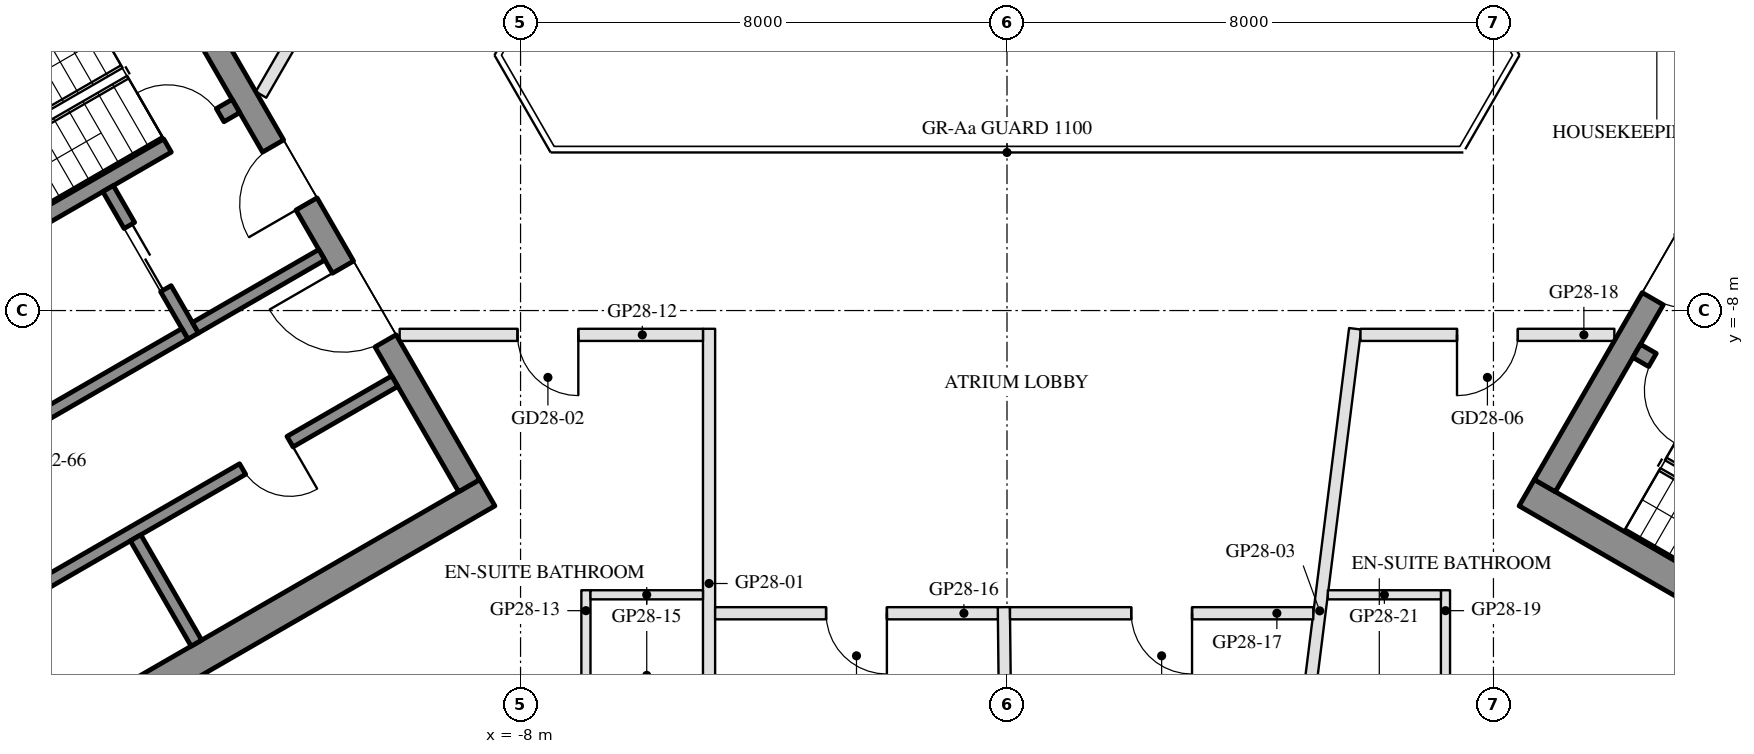
"""IFC4 building model, lengths in metres.
Left out: names, types, materials, properties, quantities, classifications, styles, units other than length and angle.
Written with IfcOpenShell. Run it as: python <this file> out.ifc"""

import sys

from ifc_helpers import new_model, si_unit, direction, frame, frame_2d, origin, place, context, subcontext, project, spatial, rectangle, extrude, element, fill, save


model = new_model("IFC4")
c1 = context("Model", 3, precision=1e-05, world=origin(), true_north=direction((0.0, 1.0)))
c2 = subcontext(c1, "Body", "Model", "MODEL_VIEW")
j1 = project(units=[si_unit("LENGTHUNIT", "METRE"), si_unit("PLANEANGLEUNIT", "RADIAN")], contexts=[c1])
p1 = place(None, origin())
s1 = spatial("IfcSite", under=j1, at=p1, CompositionType="ELEMENT")
p2 = place(p1, origin())
s2 = spatial("IfcBuilding", under=s1, at=p2, CompositionType="ELEMENT")
p3 = place(p2, frame((0.0, 0.0, 287.4)))
s3 = spatial("IfcBuildingStorey", under=s2, at=p3, CompositionType="ELEMENT", Elevation=287.4)
for number, where, z_axis, x_axis in (
    (1, (-13.797, -1.903, 0.0), (0.0, 0.0, 1.0), (-0.866, -0.5, 0.0)),
    (2, (-8.547, -10.997, 0.0), (0.0, 0.0, 1.0), (-0.866, -0.5, 0.0)),
):
    element("IfcWall", number, at=place(p3, frame(where, z_axis=z_axis, x_axis=x_axis)), inside=s3, PredefinedType="SHEAR", context=c2, shape_type="SweptSolid", body=[
        extrude(rectangle(XDim=12.129, YDim=0.5, at=frame_2d((6.064, 0.0))), origin(), (0.0, 0.0, 1.0), 3.5),
    ])
p4 = place(p3, frame((-13.845, -2.22, 0.0), z_axis=(0.0, 0.0, 1.0), x_axis=(0.500004234368, -0.866022959057, 0.0)))
e3 = element("IfcWall", 3, at=p4, inside=s3, PredefinedType="SHEAR", context=c2, shape_type="SweptSolid", body=[
    extrude(rectangle(XDim=10.0, YDim=0.4, at=frame_2d((5.0, 0.0))), origin(), (0.0, 0.0, 1.0), 3.5),
])
p5 = place(p4, frame((3.55, 0.0, 0.0)))
e4 = element("IfcOpeningElement", 4, at=p5, cuts=e3, PredefinedType="OPENING", context=c2, shape_type="SweptSolid", body=[
    extrude(rectangle(XDim=1.1, YDim=2.1, at=frame_2d((0.55, 1.05))), frame((0.0, 0.21, 0.0), z_axis=(0.0, -1.0, 0.0), x_axis=(1.0, 0.0, 0.0)), (0.0, 0.0, 1.0), 0.42),
])
p6 = place(p4, frame((5.85, 0.0, 0.0)))
e5 = element("IfcOpeningElement", 5, at=p6, cuts=e3, PredefinedType="OPENING", context=c2, shape_type="SweptSolid", body=[
    extrude(rectangle(XDim=1.4, YDim=2.1, at=frame_2d((0.7, 1.05))), frame((0.0, 0.21, 0.0), z_axis=(0.0, -1.0, 0.0), x_axis=(1.0, 0.0, 0.0)), (0.0, 0.0, 1.0), 0.42),
])
p7 = place(p3, frame((-12.681, -4.636, 0.0), z_axis=(0.0, 0.0, 1.0), x_axis=(-0.866021702275, -0.500006411147, 0.0)))
e6 = element("IfcWall", 6, at=p7, inside=s3, PredefinedType="SHEAR", context=c2, shape_type="SweptSolid", body=[
    extrude(rectangle(XDim=6.45, YDim=0.25, at=frame_2d((3.225, 0.0))), origin(), (0.0, 0.0, 1.0), 3.5),
])
p8 = place(p7, frame((0.3, 0.0, 0.0)))
e7 = element("IfcOpeningElement", 7, at=p8, cuts=e6, PredefinedType="OPENING", context=c2, shape_type="SweptSolid", body=[
    extrude(rectangle(XDim=1.0, YDim=2.1, at=frame_2d((0.5, 1.05))), frame((0.0, 0.135, 0.0), z_axis=(0.0, -1.0, 0.0), x_axis=(1.0, 0.0, 0.0)), (0.0, 0.0, 1.0), 0.27),
])
p9 = place(p3, frame((-14.783, -5.995, 0.0), z_axis=(0.0, 0.0, 1.0), x_axis=(0.49994636267, -0.866056369097, 0.0)))
e8 = element("IfcWall", 8, at=p9, inside=s3, PredefinedType="SHEAR", context=c2, shape_type="SweptSolid", body=[
    extrude(rectangle(XDim=2.8, YDim=0.2, at=frame_2d((1.4, 0.0))), origin(), (0.0, 0.0, 1.0), 3.5),
])
p10 = place(p9, frame((0.7, 0.0, 0.0)))
e9 = element("IfcOpeningElement", 9, at=p10, cuts=e8, PredefinedType="OPENING", context=c2, shape_type="SweptSolid", body=[
    extrude(rectangle(XDim=1.2, YDim=2.1, at=frame_2d((0.6, 1.05))), frame((0.0, 0.11, 0.0), z_axis=(0.0, -1.0, 0.0), x_axis=(1.0, 0.0, 0.0)), (0.0, 0.0, 1.0), 0.22),
])
p11 = place(p3, frame((-13.52, -8.383, 0.0), z_axis=(0.0, 0.0, 1.0), x_axis=(-0.866034573852, -0.49998411664, 0.0)))
e10 = element("IfcWall", 10, at=p11, inside=s3, PredefinedType="SHEAR", context=c2, shape_type="SweptSolid", body=[
    extrude(rectangle(XDim=2.8, YDim=0.2, at=frame_2d((1.4, 0.0))), origin(), (0.0, 0.0, 1.0), 3.5),
])
p12 = place(p3, frame((-11.268, -7.083, 0.0), z_axis=(0.0, 0.0, 1.0), x_axis=(-0.866050077142, -0.499957262057, 0.0)))
e11 = element("IfcWall", 11, at=p12, inside=s3, PredefinedType="SHEAR", context=c2, shape_type="SweptSolid", body=[
    extrude(rectangle(XDim=2.4, YDim=0.2, at=frame_2d((1.2, 0.0))), origin(), (0.0, 0.0, 1.0), 3.5),
])
p13 = place(p3, frame((-10.068, -9.162, 0.0), z_axis=(0.0, 0.0, 1.0), x_axis=(-0.866032725843, -0.499987317609, 0.0)))
e12 = element("IfcWall", 12, at=p13, inside=s3, PredefinedType="SHEAR", context=c2, shape_type="SweptSolid", body=[
    extrude(rectangle(XDim=10.16, YDim=0.2, at=frame_2d((5.08, 0.0))), origin(), (0.0, 0.0, 1.0), 3.5),
])
p14 = place(p13, frame((1.99, 0.0, 0.0)))
e13 = element("IfcOpeningElement", 13, at=p14, cuts=e12, PredefinedType="OPENING", context=c2, shape_type="SweptSolid", body=[
    extrude(rectangle(XDim=0.9, YDim=2.1, at=frame_2d((0.45, 1.05))), frame((0.0, 0.11, 0.0), z_axis=(0.0, -1.0, 0.0), x_axis=(1.0, 0.0, 0.0)), (0.0, 0.0, 1.0), 0.22),
])
p15 = place(p13, frame((7.07, 0.0, 0.0)))
e14 = element("IfcOpeningElement", 14, at=p15, cuts=e12, PredefinedType="OPENING", context=c2, shape_type="SweptSolid", body=[
    extrude(rectangle(XDim=0.9, YDim=2.1, at=frame_2d((0.45, 1.05))), frame((0.0, 0.11, 0.0), z_axis=(0.0, -1.0, 0.0), x_axis=(1.0, 0.0, 0.0)), (0.0, 0.0, 1.0), 0.22),
])
p16 = place(p3, frame((-14.331, -11.738, 0.0), z_axis=(0.0, 0.0, 1.0), x_axis=(0.499972520799, -0.866041268327, 0.0)))
e15 = element("IfcWall", 15, at=p16, inside=s3, PredefinedType="SHEAR", context=c2, shape_type="SweptSolid", body=[
    extrude(rectangle(XDim=2.0, YDim=0.2, at=frame_2d((1.0, 0.0))), origin(), (0.0, 0.0, 1.0), 3.5),
])
p17 = place(p3, frame((8.547, -10.997, 0.0), z_axis=(0.0, 0.0, 1.0), x_axis=(0.866024688907, -0.500001238203, 0.0)))
e16 = element("IfcWall", 16, at=p17, inside=s3, PredefinedType="SHEAR", context=c2, shape_type="SweptSolid", body=[
    extrude(rectangle(XDim=12.129, YDim=0.5, at=frame_2d((6.064, 0.0))), origin(), (0.0, 0.0, 1.0), 3.5),
])
p18 = place(p3, frame((8.845, -10.88, 0.0), z_axis=(0.0, 0.0, 1.0), x_axis=(0.500004234368, 0.866022959057, 0.0)))
e17 = element("IfcWall", 17, at=p18, inside=s3, PredefinedType="SHEAR", context=c2, shape_type="SweptSolid", body=[
    extrude(rectangle(XDim=10.0, YDim=0.4, at=frame_2d((5.0, 0.0))), origin(), (0.0, 0.0, 1.0), 3.5),
])
p19 = place(p18, frame((3.55, 0.0, 0.0)))
e18 = element("IfcOpeningElement", 18, at=p19, cuts=e17, PredefinedType="OPENING", context=c2, shape_type="SweptSolid", body=[
    extrude(rectangle(XDim=1.1, YDim=2.1, at=frame_2d((0.55, 1.05))), frame((0.0, 0.21, 0.0), z_axis=(0.0, -1.0, 0.0), x_axis=(1.0, 0.0, 0.0)), (0.0, 0.0, 1.0), 0.42),
])
p20 = place(p18, frame((5.85, 0.0, 0.0)))
e19 = element("IfcOpeningElement", 19, at=p20, cuts=e17, PredefinedType="OPENING", context=c2, shape_type="SweptSolid", body=[
    extrude(rectangle(XDim=1.4, YDim=2.1, at=frame_2d((0.7, 1.05))), frame((0.0, 0.21, 0.0), z_axis=(0.0, -1.0, 0.0), x_axis=(1.0, 0.0, 0.0)), (0.0, 0.0, 1.0), 0.42),
])
p21 = place(p3, frame((10.356, -8.664, 0.0), z_axis=(0.0, 0.0, 1.0), x_axis=(0.866028629588, -0.499994412703, 0.0)))
e20 = element("IfcWall", 20, at=p21, inside=s3, PredefinedType="SHEAR", context=c2, shape_type="SweptSolid", body=[
    extrude(rectangle(XDim=6.45, YDim=0.25, at=frame_2d((3.225, 0.0))), origin(), (0.0, 0.0, 1.0), 3.5),
])
p22 = place(p21, frame((0.3, 0.0, 0.0)))
e21 = element("IfcOpeningElement", 21, at=p22, cuts=e20, PredefinedType="OPENING", context=c2, shape_type="SweptSolid", body=[
    extrude(rectangle(XDim=1.0, YDim=2.1, at=frame_2d((0.5, 1.05))), frame((0.0, 0.135, 0.0), z_axis=(0.0, -1.0, 0.0), x_axis=(1.0, 0.0, 0.0)), (0.0, 0.0, 1.0), 0.27),
])
p23 = place(p3, frame((-4.9, -16.679, 0.0), z_axis=(0.0, 0.0, 1.0), x_axis=(0.0, 1.0, 0.0)))
e22 = element("IfcWall", 22, at=p23, inside=s3, PredefinedType="PARTITIONING", context=c2, shape_type="SweptSolid", body=[
    extrude(rectangle(XDim=8.379, YDim=0.2, at=frame_2d((4.189, 0.0))), origin(), (0.0, 0.0, 1.0), 3.1),
])
p24 = place(p3, frame((-0.021, -15.633, 0.0), z_axis=(0.0, 0.0, 1.0), x_axis=(-0.010991269362, 0.999939594174, 0.0)))
e23 = element("IfcWall", 23, at=p24, inside=s3, PredefinedType="PARTITIONING", context=c2, shape_type="SweptSolid", body=[
    extrude(rectangle(XDim=2.754, YDim=0.2, at=frame_2d((1.377, 0.0))), origin(), (0.0, 0.0, 1.0), 3.05),
])
p25 = place(p3, frame((4.56, -17.579, 0.0), z_axis=(0.0, 0.0, 1.0), x_axis=(0.124584174438, 0.992209042228, 0.0)))
e24 = element("IfcWall", 24, at=p25, inside=s3, PredefinedType="PARTITIONING", context=c2, shape_type="SweptSolid", body=[
    extrude(rectangle(XDim=9.351, YDim=0.2, at=frame_2d((4.676, 0.0))), origin(), (0.0, 0.0, 1.0), 3.1),
])
p26 = place(p3, frame((-5.0, -8.4, 0.0), z_axis=(0.0, 0.0, 1.0), x_axis=(-1.0, 0.0, 0.0)))
e25 = element("IfcWall", 25, at=p26, inside=s3, PredefinedType="PARTITIONING", context=c2, shape_type="SweptSolid", body=[
    extrude(rectangle(XDim=4.988, YDim=0.2, at=frame_2d((2.494, 0.0))), origin(), (0.0, 0.0, 1.0), 3.05),
])
p27 = place(p26, frame((2.05, 0.0, 0.0)))
e26 = element("IfcOpeningElement", 26, at=p27, cuts=e25, PredefinedType="OPENING", context=c2, shape_type="SweptSolid", body=[
    extrude(rectangle(XDim=1.0, YDim=2.1, at=frame_2d((0.5, 1.05))), frame((0.0, 0.11, 0.0), z_axis=(0.0, -1.0, 0.0), x_axis=(1.0, 0.0, 0.0)), (0.0, 0.0, 1.0), 0.22),
])
p28 = place(p3, frame((-6.925, -12.6, 0.0), z_axis=(0.0, 0.0, 1.0), x_axis=(0.0, -1.0, 0.0)))
e27 = element("IfcWall", 27, at=p28, inside=s3, PredefinedType="PARTITIONING", context=c2, shape_type="SweptSolid", body=[
    extrude(rectangle(XDim=2.8, YDim=0.15, at=frame_2d((1.4, 0.0))), origin(), (0.0, 0.0, 1.0), 3.05),
])
p29 = place(p28, frame((1.4, 0.0, 0.0)))
e28 = element("IfcOpeningElement", 28, at=p29, cuts=e27, PredefinedType="OPENING", context=c2, shape_type="SweptSolid", body=[
    extrude(rectangle(XDim=0.9, YDim=2.1, at=frame_2d((0.45, 1.05))), frame((0.0, 0.085, 0.0), z_axis=(0.0, -1.0, 0.0), x_axis=(1.0, 0.0, 0.0)), (0.0, 0.0, 1.0), 0.17),
])
p30 = place(p3, frame((-6.85, -12.675, 0.0), z_axis=(0.0, 0.0, 1.0), x_axis=(1.0, 0.0, 0.0)))
e29 = element("IfcWall", 29, at=p30, inside=s3, PredefinedType="PARTITIONING", context=c2, shape_type="SweptSolid", body=[
    extrude(rectangle(XDim=1.85, YDim=0.15, at=frame_2d((0.925, 0.0))), origin(), (0.0, 0.0, 1.0), 3.55),
])
p31 = place(p3, frame((-0.151, -12.979, 0.0), z_axis=(0.0, 0.0, 1.0), x_axis=(-1.0, 0.0, 0.0)))
e30 = element("IfcWall", 30, at=p31, inside=s3, PredefinedType="PARTITIONING", context=c2, shape_type="SweptSolid", body=[
    extrude(rectangle(XDim=4.649, YDim=0.2, at=frame_2d((2.325, 0.0))), origin(), (0.0, 0.0, 1.0), 3.05),
])
p32 = place(p31, frame((1.825, 0.0, 0.0)))
e31 = element("IfcOpeningElement", 31, at=p32, cuts=e30, PredefinedType="OPENING", context=c2, shape_type="SweptSolid", body=[
    extrude(rectangle(XDim=1.0, YDim=2.1, at=frame_2d((0.5, 1.05))), frame((0.0, 0.11, 0.0), z_axis=(0.0, -1.0, 0.0), x_axis=(1.0, 0.0, 0.0)), (0.0, 0.0, 1.0), 0.22),
])
p33 = place(p3, frame((5.037, -12.979, 0.0), z_axis=(0.0, 0.0, 1.0), x_axis=(-1.0, 0.0, 0.0)))
e32 = element("IfcWall", 32, at=p33, inside=s3, PredefinedType="PARTITIONING", context=c2, shape_type="SweptSolid", body=[
    extrude(rectangle(XDim=4.988, YDim=0.2, at=frame_2d((2.494, 0.0))), origin(), (0.0, 0.0, 1.0), 3.05),
])
p34 = place(p33, frame((1.994, 0.0, 0.0)))
e33 = element("IfcOpeningElement", 33, at=p34, cuts=e32, PredefinedType="OPENING", context=c2, shape_type="SweptSolid", body=[
    extrude(rectangle(XDim=1.0, YDim=2.1, at=frame_2d((0.5, 1.05))), frame((0.0, 0.11, 0.0), z_axis=(0.0, -1.0, 0.0), x_axis=(1.0, 0.0, 0.0)), (0.0, 0.0, 1.0), 0.22),
])
p35 = place(p3, frame((9.988, -8.4, 0.0), z_axis=(0.0, 0.0, 1.0), x_axis=(-1.0, 0.0, 0.0)))
e34 = element("IfcWall", 34, at=p35, inside=s3, PredefinedType="PARTITIONING", context=c2, shape_type="SweptSolid", body=[
    extrude(rectangle(XDim=4.175, YDim=0.2, at=frame_2d((2.087, 0.0))), origin(), (0.0, 0.0, 1.0), 3.05),
])
p36 = place(p35, frame((1.587, 0.0, 0.0)))
e35 = element("IfcOpeningElement", 35, at=p36, cuts=e34, PredefinedType="OPENING", context=c2, shape_type="SweptSolid", body=[
    extrude(rectangle(XDim=1.0, YDim=2.1, at=frame_2d((0.5, 1.05))), frame((0.0, 0.11, 0.0), z_axis=(0.0, -1.0, 0.0), x_axis=(1.0, 0.0, 0.0)), (0.0, 0.0, 1.0), 0.22),
])
p37 = place(p3, frame((7.211, -15.4, 0.0), z_axis=(0.0, 0.0, 1.0), x_axis=(0.0, 1.0, 0.0)))
e36 = element("IfcWall", 36, at=p37, inside=s3, PredefinedType="PARTITIONING", context=c2, shape_type="SweptSolid", body=[
    extrude(rectangle(XDim=2.8, YDim=0.15, at=frame_2d((1.4, 0.0))), origin(), (0.0, 0.0, 1.0), 3.55),
])
p38 = place(p37, frame((0.5, 0.0, 0.0)))
e37 = element("IfcOpeningElement", 37, at=p38, cuts=e36, PredefinedType="OPENING", context=c2, shape_type="SweptSolid", body=[
    extrude(rectangle(XDim=0.9, YDim=2.1, at=frame_2d((0.45, 1.05))), frame((0.0, 0.085, 0.0), z_axis=(0.0, -1.0, 0.0), x_axis=(1.0, 0.0, 0.0)), (0.0, 0.0, 1.0), 0.17),
])
p39 = place(p3, frame((5.277, -12.675, 0.0), z_axis=(0.0, 0.0, 1.0), x_axis=(1.0, 0.0, 0.0)))
e38 = element("IfcWall", 38, at=p39, inside=s3, PredefinedType="PARTITIONING", context=c2, shape_type="SweptSolid", body=[
    extrude(rectangle(XDim=1.859, YDim=0.15, at=frame_2d((0.93, 0.0))), origin(), (0.0, 0.0, 1.0), 3.05),
])
p40 = place(p3, frame((10.382, -1.182, 0.0), z_axis=(0.0, 0.0, 1.0), x_axis=(0.50002859319, -0.866008894869, 0.0)))
e39 = element("IfcWall", 39, at=p40, inside=s3, PredefinedType="PARTITIONING", context=c2, shape_type="SweptSolid", body=[
    extrude(rectangle(XDim=3.774, YDim=0.2, at=frame_2d((1.887, 0.0))), origin(), (0.0, 0.0, 1.0), 3.05),
])
p41 = place(p40, frame((1.387, 0.0, 0.0)))
e40 = element("IfcOpeningElement", 40, at=p41, cuts=e39, PredefinedType="OPENING", context=c2, shape_type="SweptSolid", body=[
    extrude(rectangle(XDim=1.0, YDim=2.1, at=frame_2d((0.5, 1.05))), frame((0.0, 0.11, 0.0), z_axis=(0.0, -1.0, 0.0), x_axis=(1.0, 0.0, 0.0)), (0.0, 0.0, 1.0), 0.22),
])
p42 = place(p3, frame((-12.269, -4.45, 0.0), z_axis=(0.0, 0.0, 1.0), x_axis=(0.500000040646, 0.866025380318, 0.0)))
e41 = element("IfcWall", 41, at=p42, inside=s3, PredefinedType="PARTITIONING", context=c2, shape_type="SweptSolid", body=[
    extrude(rectangle(XDim=3.781, YDim=0.2, at=frame_2d((1.891, 0.0))), origin(), (0.0, 0.0, 1.0), 3.05),
])
p43 = place(p42, frame((1.391, 0.0, 0.0)))
e42 = element("IfcOpeningElement", 42, at=p43, cuts=e41, PredefinedType="OPENING", context=c2, shape_type="SweptSolid", body=[
    extrude(rectangle(XDim=1.0, YDim=2.1, at=frame_2d((0.5, 1.05))), frame((0.0, 0.11, 0.0), z_axis=(0.0, -1.0, 0.0), x_axis=(1.0, 0.0, 0.0)), (0.0, 0.0, 1.0), 0.22),
])
p44 = place(p10, origin())
e43 = element("IfcDoor", 43, at=p44, inside=s3, OperationType="DOUBLE_DOOR_SLIDING", PredefinedType="DOOR", context=c2, shape_type="SweptSolid", body=[
    extrude(rectangle(XDim=1.2, YDim=2.1, at=frame_2d((0.6, 1.05))), frame((0.0, 0.025, 0.0), z_axis=(0.0, -1.0, 0.0), x_axis=(1.0, 0.0, 0.0)), (0.0, 0.0, 1.0), 0.05),
])
fill(e9, e43)
p45 = place(p14, origin())
e44 = element("IfcDoor", 44, at=p45, inside=s3, OperationType="SINGLE_SWING_LEFT", PredefinedType="DOOR", context=c2, shape_type="SweptSolid", body=[
    extrude(rectangle(XDim=0.9, YDim=2.1, at=frame_2d((0.45, 1.05))), frame((0.0, 0.025, 0.0), z_axis=(0.0, -1.0, 0.0), x_axis=(1.0, 0.0, 0.0)), (0.0, 0.0, 1.0), 0.05),
])
fill(e13, e44)
p46 = place(p5, frame((1.1, 0.0, 0.0), z_axis=(0.0, 0.0, 1.0), x_axis=(-1.0, 0.0, 0.0)))
e45 = element("IfcDoor", 45, at=p46, inside=s3, OperationType="SINGLE_SWING_LEFT", PredefinedType="DOOR", context=c2, shape_type="SweptSolid", body=[
    extrude(rectangle(XDim=1.1, YDim=2.1, at=frame_2d((0.55, 1.05))), frame((0.0, 0.025, 0.0), z_axis=(0.0, -1.0, 0.0), x_axis=(1.0, 0.0, 0.0)), (0.0, 0.0, 1.0), 0.05),
])
fill(e4, e45)
p47 = place(p6, frame((1.4, 0.0, 0.0), z_axis=(0.0, 0.0, 1.0), x_axis=(-1.0, 0.0, 0.0)))
e46 = element("IfcDoor", 46, at=p47, inside=s3, OperationType="DOUBLE_DOOR_SINGLE_SWING", PredefinedType="DOOR", context=c2, shape_type="SweptSolid", body=[
    extrude(rectangle(XDim=1.4, YDim=2.1, at=frame_2d((0.7, 1.05))), frame((0.0, 0.025, 0.0), z_axis=(0.0, -1.0, 0.0), x_axis=(1.0, 0.0, 0.0)), (0.0, 0.0, 1.0), 0.05),
])
fill(e5, e46)
p48 = place(p8, frame((1.0, 0.0, 0.0), z_axis=(0.0, 0.0, 1.0), x_axis=(-1.0, 0.0, 0.0)))
e47 = element("IfcDoor", 47, at=p48, inside=s3, OperationType="SINGLE_SWING_LEFT", PredefinedType="DOOR", context=c2, shape_type="SweptSolid", body=[
    extrude(rectangle(XDim=1.0, YDim=2.1, at=frame_2d((0.5, 1.05))), frame((0.0, 0.025, 0.0), z_axis=(0.0, -1.0, 0.0), x_axis=(1.0, 0.0, 0.0)), (0.0, 0.0, 1.0), 0.05),
])
fill(e7, e47)
p49 = place(p19, frame((1.1, 0.0, 0.0), z_axis=(0.0, 0.0, 1.0), x_axis=(-1.0, 0.0, 0.0)))
e48 = element("IfcDoor", 48, at=p49, inside=s3, OperationType="SINGLE_SWING_LEFT", PredefinedType="DOOR", context=c2, shape_type="SweptSolid", body=[
    extrude(rectangle(XDim=1.1, YDim=2.1, at=frame_2d((0.55, 1.05))), frame((0.0, 0.025, 0.0), z_axis=(0.0, -1.0, 0.0), x_axis=(1.0, 0.0, 0.0)), (0.0, 0.0, 1.0), 0.05),
])
fill(e18, e48)
p50 = place(p22, frame((1.0, 0.0, 0.0), z_axis=(0.0, 0.0, 1.0), x_axis=(-1.0, 0.0, 0.0)))
e49 = element("IfcDoor", 49, at=p50, inside=s3, OperationType="SINGLE_SWING_LEFT", PredefinedType="DOOR", context=c2, shape_type="SweptSolid", body=[
    extrude(rectangle(XDim=1.0, YDim=2.1, at=frame_2d((0.5, 1.05))), frame((0.0, 0.025, 0.0), z_axis=(0.0, -1.0, 0.0), x_axis=(1.0, 0.0, 0.0)), (0.0, 0.0, 1.0), 0.05),
])
fill(e21, e49)
p51 = place(p27, origin())
e50 = element("IfcDoor", 50, at=p51, inside=s3, OperationType="SINGLE_SWING_LEFT", PredefinedType="DOOR", context=c2, shape_type="SweptSolid", body=[
    extrude(rectangle(XDim=1.0, YDim=2.1, at=frame_2d((0.5, 1.05))), frame((0.0, 0.025, 0.0), z_axis=(0.0, -1.0, 0.0), x_axis=(1.0, 0.0, 0.0)), (0.0, 0.0, 1.0), 0.05),
])
fill(e26, e50)
p52 = place(p32, origin())
e51 = element("IfcDoor", 51, at=p52, inside=s3, OperationType="SINGLE_SWING_LEFT", PredefinedType="DOOR", context=c2, shape_type="SweptSolid", body=[
    extrude(rectangle(XDim=1.0, YDim=2.1, at=frame_2d((0.5, 1.05))), frame((0.0, 0.025, 0.0), z_axis=(0.0, -1.0, 0.0), x_axis=(1.0, 0.0, 0.0)), (0.0, 0.0, 1.0), 0.05),
])
fill(e31, e51)
p53 = place(p34, origin())
e52 = element("IfcDoor", 52, at=p53, inside=s3, OperationType="SINGLE_SWING_LEFT", PredefinedType="DOOR", context=c2, shape_type="SweptSolid", body=[
    extrude(rectangle(XDim=1.0, YDim=2.1, at=frame_2d((0.5, 1.05))), frame((0.0, 0.025, 0.0), z_axis=(0.0, -1.0, 0.0), x_axis=(1.0, 0.0, 0.0)), (0.0, 0.0, 1.0), 0.05),
])
fill(e33, e52)
p54 = place(p36, origin())
e53 = element("IfcDoor", 53, at=p54, inside=s3, OperationType="SINGLE_SWING_RIGHT", PredefinedType="DOOR", context=c2, shape_type="SweptSolid", body=[
    extrude(rectangle(XDim=1.0, YDim=2.1, at=frame_2d((0.5, 1.05))), frame((0.0, 0.025, 0.0), z_axis=(0.0, -1.0, 0.0), x_axis=(1.0, 0.0, 0.0)), (0.0, 0.0, 1.0), 0.05),
])
fill(e35, e53)
save(model, sys.argv[1])
